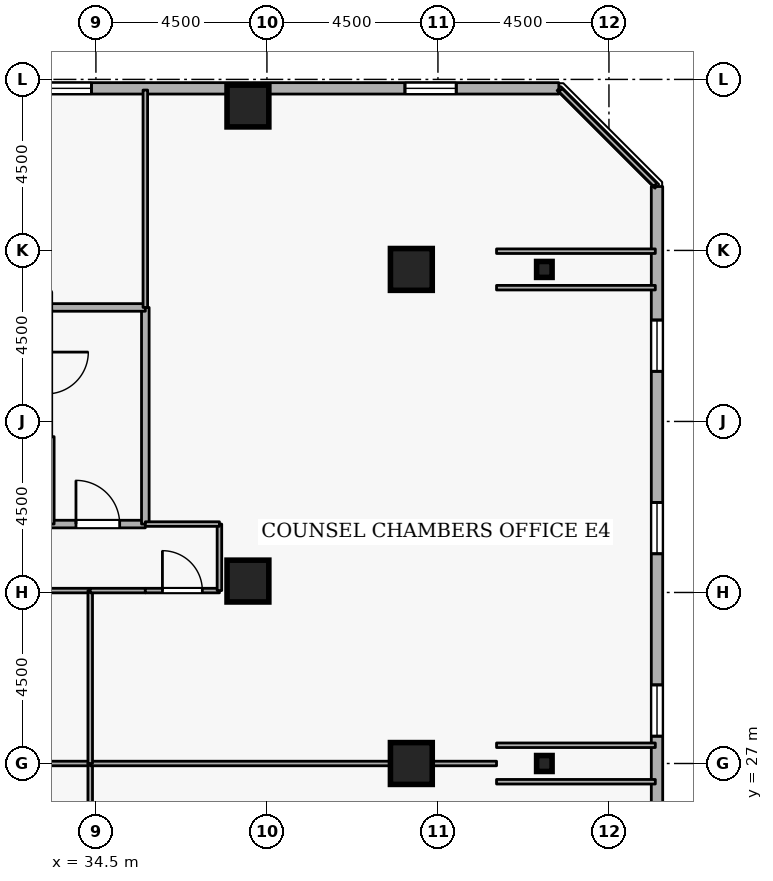
"""IFC4 building model, lengths in metres.
Left out: names, types, materials, properties, quantities, classifications, styles, units other than length and angle.
Written with IfcOpenShell. Run it as: python <this file> out.ifc"""

import sys

from ifc_helpers import new_model, si_unit, direction, frame, frame_2d, origin, origin_2d, place, context, subcontext, project, spatial, rectangle, i_section, extrude, element, fill, save


model = new_model("IFC4")
c1 = context("Model", 3, precision=1e-05, world=origin(), true_north=direction((0.0, 1.0)))
c2 = subcontext(c1, "Body", "Model", "MODEL_VIEW")
j1 = project(units=[si_unit("LENGTHUNIT", "METRE"), si_unit("PLANEANGLEUNIT", "RADIAN")], contexts=[c1])
p1 = place(None, origin())
s1 = spatial("IfcSite", under=j1, at=p1, CompositionType="ELEMENT")
p2 = place(p1, origin())
s2 = spatial("IfcBuilding", under=s1, at=p2, CompositionType="ELEMENT")
p3 = place(p2, frame((0.0, 0.0, 170.7)))
s3 = spatial("IfcBuildingStorey", under=s2, at=p3, CompositionType="ELEMENT", Elevation=170.7)
for number, where, z_axis, x_axis in (
    (1, (42.8, 27.0, 0.0), (0.0, 0.0, 1.0), (1.0, 0.0, 0.0)),
    (2, (42.8, 40.0, 0.0), (0.0, 0.0, 1.0), (1.0, 0.0, 0.0)),
    (3, (38.5, 44.3, 0.0), (0.0, 0.0, 1.0), (1.0, 0.0, 0.0)),
    (4, (38.5, 31.8, 0.0), (0.0, 0.0, 1.0), (1.0, 0.0, 0.0)),
):
    element("IfcColumn", number, at=place(p3, frame(where, z_axis=z_axis, x_axis=x_axis)), inside=s3, PredefinedType="COLUMN", context=c2, shape_type="SweptSolid", body=[
        extrude(rectangle(XDim=1.1, YDim=1.1, at=origin_2d()), origin(), (0.0, 0.0, 1.0), 3.6),
    ])
for number, where, z_axis, x_axis in (
    (5, (46.3, 27.0, 0.0), (0.0, 0.0, 1.0), (1.0, 0.0, 0.0)),
    (6, (46.3, 40.0, 0.0), (0.0, 0.0, 1.0), (1.0, 0.0, 0.0)),
):
    element("IfcColumn", number, at=place(p3, frame(where, z_axis=z_axis, x_axis=x_axis)), inside=s3, PredefinedType="COLUMN", context=c2, shape_type="SweptSolid", body=[
        extrude(i_section(OverallWidth=0.407, OverallDepth=0.419, WebThickness=0.031, FlangeThickness=0.049, FilletRadius=0.015, at=origin_2d()), origin(), (0.0, 0.0, 1.0), 3.6),
    ])
p4 = place(p3, frame((49.265, 5.819, 0.0), z_axis=(0.0, 0.0, 1.0), x_axis=(0.0, 1.0, 0.0)))
e7 = element("IfcWall", 7, at=p4, inside=s3, PredefinedType="STANDARD", context=c2, shape_type="SweptSolid", body=[
    extrude(rectangle(XDim=36.363, YDim=0.3, at=frame_2d((18.181, 0.0))), origin(), (0.0, 0.0, 1.0), 2.22),
])
p5 = place(p4, frame((2.7, 0.0, 0.72)))
e8 = element("IfcOpeningElement", 8, at=p5, cuts=e7, PredefinedType="OPENING", context=c2, shape_type="SweptSolid", body=[
    extrude(rectangle(XDim=1.35, YDim=1.05, at=frame_2d((0.675, 0.525))), frame((0.0, 0.16, 0.0), z_axis=(0.0, -1.0, 0.0), x_axis=(1.0, 0.0, 0.0)), (0.0, 0.0, 1.0), 0.32),
])
p6 = place(p4, frame((12.3, 0.0, 0.72)))
e9 = element("IfcOpeningElement", 9, at=p6, cuts=e7, PredefinedType="OPENING", context=c2, shape_type="SweptSolid", body=[
    extrude(rectangle(XDim=1.35, YDim=1.05, at=frame_2d((0.675, 0.525))), frame((0.0, 0.16, 0.0), z_axis=(0.0, -1.0, 0.0), x_axis=(1.0, 0.0, 0.0)), (0.0, 0.0, 1.0), 0.32),
])
p7 = place(p4, frame((17.1, 0.0, 0.72)))
e10 = element("IfcOpeningElement", 10, at=p7, cuts=e7, PredefinedType="OPENING", context=c2, shape_type="SweptSolid", body=[
    extrude(rectangle(XDim=1.35, YDim=1.05, at=frame_2d((0.675, 0.525))), frame((0.0, 0.16, 0.0), z_axis=(0.0, -1.0, 0.0), x_axis=(1.0, 0.0, 0.0)), (0.0, 0.0, 1.0), 0.32),
])
p8 = place(p4, frame((21.9, 0.0, 0.72)))
e11 = element("IfcOpeningElement", 11, at=p8, cuts=e7, PredefinedType="OPENING", context=c2, shape_type="SweptSolid", body=[
    extrude(rectangle(XDim=1.35, YDim=1.05, at=frame_2d((0.675, 0.525))), frame((0.0, 0.16, 0.0), z_axis=(0.0, -1.0, 0.0), x_axis=(1.0, 0.0, 0.0)), (0.0, 0.0, 1.0), 0.32),
])
p9 = place(p4, frame((26.7, 0.0, 0.72)))
e12 = element("IfcOpeningElement", 12, at=p9, cuts=e7, PredefinedType="OPENING", context=c2, shape_type="SweptSolid", body=[
    extrude(rectangle(XDim=1.35, YDim=1.05, at=frame_2d((0.675, 0.525))), frame((0.0, 0.16, 0.0), z_axis=(0.0, -1.0, 0.0), x_axis=(1.0, 0.0, 0.0)), (0.0, 0.0, 1.0), 0.32),
])
p10 = place(p4, frame((31.5, 0.0, 0.72)))
e13 = element("IfcOpeningElement", 13, at=p10, cuts=e7, PredefinedType="OPENING", context=c2, shape_type="SweptSolid", body=[
    extrude(rectangle(XDim=1.35, YDim=1.05, at=frame_2d((0.675, 0.525))), frame((0.0, 0.16, 0.0), z_axis=(0.0, -1.0, 0.0), x_axis=(1.0, 0.0, 0.0)), (0.0, 0.0, 1.0), 0.32),
])
p11 = place(p3, frame((46.681, 44.765, 0.0), z_axis=(0.0, 0.0, 1.0), x_axis=(-1.0, 0.0, 0.0)))
e14 = element("IfcWall", 14, at=p11, inside=s3, PredefinedType="STANDARD", context=c2, shape_type="SweptSolid", body=[
    extrude(rectangle(XDim=36.363, YDim=0.3, at=frame_2d((18.181, 0.0))), origin(), (0.0, 0.0, 1.0), 2.22),
])
p12 = place(p11, frame((2.7, 0.0, 0.72)))
e15 = element("IfcOpeningElement", 15, at=p12, cuts=e14, PredefinedType="OPENING", context=c2, shape_type="SweptSolid", body=[
    extrude(rectangle(XDim=1.35, YDim=1.05, at=frame_2d((0.675, 0.525))), frame((0.0, 0.16, 0.0), z_axis=(0.0, -1.0, 0.0), x_axis=(1.0, 0.0, 0.0)), (0.0, 0.0, 1.0), 0.32),
])
p13 = place(p11, frame((12.3, 0.0, 0.72)))
e16 = element("IfcOpeningElement", 16, at=p13, cuts=e14, PredefinedType="OPENING", context=c2, shape_type="SweptSolid", body=[
    extrude(rectangle(XDim=1.35, YDim=1.05, at=frame_2d((0.675, 0.525))), frame((0.0, 0.16, 0.0), z_axis=(0.0, -1.0, 0.0), x_axis=(1.0, 0.0, 0.0)), (0.0, 0.0, 1.0), 0.32),
])
p14 = place(p11, frame((17.1, 0.0, 0.72)))
e17 = element("IfcOpeningElement", 17, at=p14, cuts=e14, PredefinedType="OPENING", context=c2, shape_type="SweptSolid", body=[
    extrude(rectangle(XDim=1.35, YDim=1.05, at=frame_2d((0.675, 0.525))), frame((0.0, 0.16, 0.0), z_axis=(0.0, -1.0, 0.0), x_axis=(1.0, 0.0, 0.0)), (0.0, 0.0, 1.0), 0.32),
])
p15 = place(p11, frame((26.7, 0.0, 0.72)))
e18 = element("IfcOpeningElement", 18, at=p15, cuts=e14, PredefinedType="OPENING", context=c2, shape_type="SweptSolid", body=[
    extrude(rectangle(XDim=1.35, YDim=1.05, at=frame_2d((0.675, 0.525))), frame((0.0, 0.16, 0.0), z_axis=(0.0, -1.0, 0.0), x_axis=(1.0, 0.0, 0.0)), (0.0, 0.0, 1.0), 0.32),
])
p16 = place(p3, frame((33.3, 33.3, 0.0), z_axis=(0.0, 0.0, 1.0), x_axis=(1.0, 0.0, 0.0)))
e19 = element("IfcWall", 19, at=p16, inside=s3, PredefinedType="STANDARD", context=c2, shape_type="SweptSolid", body=[
    extrude(rectangle(XDim=2.5, YDim=0.2, at=frame_2d((1.25, 0.0))), origin(), (0.0, 0.0, 1.0), 3.26),
])
p17 = place(p16, frame((0.675, 0.0, 0.0)))
e20 = element("IfcOpeningElement", 20, at=p17, cuts=e19, PredefinedType="OPENING", context=c2, shape_type="SweptSolid", body=[
    extrude(rectangle(XDim=1.15, YDim=2.1, at=frame_2d((0.575, 1.05))), frame((0.0, 0.11, 0.0), z_axis=(0.0, -1.0, 0.0), x_axis=(1.0, 0.0, 0.0)), (0.0, 0.0, 1.0), 0.22),
])
p18 = place(p3, frame((35.8, 33.3, 0.0), z_axis=(0.0, 0.0, 1.0), x_axis=(0.0, 1.0, 0.0)))
e21 = element("IfcWall", 21, at=p18, inside=s3, PredefinedType="STANDARD", context=c2, shape_type="SweptSolid", body=[
    extrude(rectangle(XDim=5.7, YDim=0.2, at=frame_2d((2.85, 0.0))), origin(), (0.0, 0.0, 1.0), 3.26),
])
p19 = place(p3, frame((35.8, 39.0, 0.0), z_axis=(0.0, 0.0, 1.0), x_axis=(-1.0, 0.0, 0.0)))
e22 = element("IfcWall", 22, at=p19, inside=s3, PredefinedType="STANDARD", context=c2, shape_type="SweptSolid", body=[
    extrude(rectangle(XDim=2.5, YDim=0.2, at=frame_2d((1.25, 0.0))), origin(), (0.0, 0.0, 1.0), 3.26),
])
p20 = place(p3, frame((33.3, 35.6, 0.0), z_axis=(0.0, 0.0, 1.0), x_axis=(0.0, -1.0, 0.0)))
e23 = element("IfcWall", 23, at=p20, inside=s3, PredefinedType="STANDARD", context=c2, shape_type="SweptSolid", body=[
    extrude(rectangle(XDim=2.3, YDim=0.2, at=frame_2d((1.15, 0.0))), origin(), (0.0, 0.0, 1.0), 2.465),
])
p21 = place(p3, frame((32.45, 27.0, 0.0), z_axis=(0.0, 0.0, 1.0), x_axis=(1.0, 0.0, 0.0)))
e24 = element("IfcWall", 24, at=p21, inside=s3, PredefinedType="PARTITIONING", context=c2, shape_type="SweptSolid", body=[
    extrude(rectangle(XDim=1.9, YDim=0.12, at=frame_2d((0.95, 0.0))), origin(), (0.0, 0.0, 1.0), 1.785),
])
p22 = place(p3, frame((34.35, 27.0, 0.0), z_axis=(0.0, 0.0, 1.0), x_axis=(0.0, -1.0, 0.0)))
e25 = element("IfcWall", 25, at=p22, inside=s3, PredefinedType="PARTITIONING", context=c2, shape_type="SweptSolid", body=[
    extrude(rectangle(XDim=4.55, YDim=0.12, at=frame_2d((2.275, 0.0))), origin(), (0.0, 0.0, 1.0), 3.26),
])
p23 = place(p3, frame((34.35, 27.0, 0.0), z_axis=(0.0, 0.0, 1.0), x_axis=(1.0, 0.0, 0.0)))
e26 = element("IfcWall", 26, at=p23, inside=s3, PredefinedType="PARTITIONING", context=c2, shape_type="SweptSolid", body=[
    extrude(rectangle(XDim=10.692, YDim=0.12, at=frame_2d((5.346, 0.0))), origin(), (0.0, 0.0, 1.0), 1.785),
])
p24 = place(p3, frame((45.042, 26.52, 0.0), z_axis=(0.0, 0.0, 1.0), x_axis=(1.0, 0.0, 0.0)))
e27 = element("IfcWall", 27, at=p24, inside=s3, PredefinedType="PARTITIONING", context=c2, shape_type="SweptSolid", body=[
    extrude(rectangle(XDim=4.178, YDim=0.12, at=frame_2d((2.089, 0.0))), origin(), (0.0, 0.0, 1.0), 1.785),
])
p25 = place(p3, frame((32.45, 31.55, 0.0), z_axis=(0.0, 0.0, 1.0), x_axis=(1.0, 0.0, 0.0)))
e28 = element("IfcWall", 28, at=p25, inside=s3, PredefinedType="PARTITIONING", context=c2, shape_type="SweptSolid", body=[
    extrude(rectangle(XDim=1.9, YDim=0.12, at=frame_2d((0.95, 0.0))), origin(), (0.0, 0.0, 1.0), 3.26),
])
p26 = place(p3, frame((34.35, 31.55, 0.0), z_axis=(0.0, 0.0, 1.0), x_axis=(0.0, -1.0, 0.0)))
e29 = element("IfcWall", 29, at=p26, inside=s3, PredefinedType="PARTITIONING", context=c2, shape_type="SweptSolid", body=[
    extrude(rectangle(XDim=4.55, YDim=0.12, at=frame_2d((2.275, 0.0))), origin(), (0.0, 0.0, 1.0), 3.26),
])
p27 = place(p3, frame((34.35, 31.55, 0.0), z_axis=(0.0, 0.0, 1.0), x_axis=(1.0, 0.0, 0.0)))
e30 = element("IfcWall", 30, at=p27, inside=s3, PredefinedType="PARTITIONING", context=c2, shape_type="SweptSolid", body=[
    extrude(rectangle(XDim=1.45, YDim=0.12, at=frame_2d((0.725, 0.0))), origin(), (0.0, 0.0, 1.0), 3.26),
])
p28 = place(p3, frame((35.8, 31.55, 0.0), z_axis=(0.0, 0.0, 1.0), x_axis=(1.0, 0.0, 0.0)))
e31 = element("IfcWall", 31, at=p28, inside=s3, PredefinedType="PARTITIONING", context=c2, shape_type="SweptSolid", body=[
    extrude(rectangle(XDim=1.95, YDim=0.12, at=frame_2d((0.975, 0.0))), origin(), (0.0, 0.0, 1.0), 3.26),
])
p29 = place(p28, frame((0.45, 0.0, 0.0)))
e32 = element("IfcOpeningElement", 32, at=p29, cuts=e31, PredefinedType="OPENING", context=c2, shape_type="SweptSolid", body=[
    extrude(rectangle(XDim=1.05, YDim=2.1, at=frame_2d((0.525, 1.05))), frame((0.0, 0.07, 0.0), z_axis=(0.0, -1.0, 0.0), x_axis=(1.0, 0.0, 0.0)), (0.0, 0.0, 1.0), 0.14),
])
p30 = place(p3, frame((37.75, 31.55, 0.0), z_axis=(0.0, 0.0, 1.0), x_axis=(0.0, 1.0, 0.0)))
e33 = element("IfcWall", 33, at=p30, inside=s3, PredefinedType="PARTITIONING", context=c2, shape_type="SweptSolid", body=[
    extrude(rectangle(XDim=1.75, YDim=0.12, at=frame_2d((0.875, 0.0))), origin(), (0.0, 0.0, 1.0), 3.26),
])
p31 = place(p3, frame((37.75, 33.3, 0.0), z_axis=(0.0, 0.0, 1.0), x_axis=(-1.0, 0.0, 0.0)))
e34 = element("IfcWall", 34, at=p31, inside=s3, PredefinedType="PARTITIONING", context=c2, shape_type="SweptSolid", body=[
    extrude(rectangle(XDim=1.95, YDim=0.12, at=frame_2d((0.975, 0.0))), origin(), (0.0, 0.0, 1.0), 3.26),
])
p32 = place(p3, frame((35.8, 39.0, 0.0), z_axis=(0.0, 0.0, 1.0), x_axis=(0.0, 1.0, 0.0)))
e35 = element("IfcWall", 35, at=p32, inside=s3, PredefinedType="PARTITIONING", context=c2, shape_type="SweptSolid", body=[
    extrude(rectangle(XDim=5.72, YDim=0.12, at=frame_2d((2.86, 0.0))), origin(), (0.0, 0.0, 1.0), 3.26),
])
p33 = place(p3, frame((46.725, 44.72, 0.0), z_axis=(0.0, 0.0, 1.0), x_axis=(0.707106781187, -0.707106781187, 0.0)))
e36 = element("IfcWall", 36, at=p33, inside=s3, PredefinedType="PARTITIONING", context=c2, shape_type="SweptSolid", body=[
    extrude(rectangle(XDim=3.528, YDim=0.12, at=frame_2d((1.764, 0.0))), origin(), (0.0, 0.0, 1.0), 3.26),
])
for number, where, z_axis, x_axis in (
    (37, (49.22, 40.48, 0.0), (0.0, 0.0, 1.0), (-1.0, 0.0, 0.0)),
    (38, (45.042, 39.52, 0.0), (0.0, 0.0, 1.0), (1.0, 0.0, 0.0)),
    (39, (49.22, 27.48, 0.0), (0.0, 0.0, 1.0), (-1.0, 0.0, 0.0)),
):
    element("IfcWall", number, at=place(p3, frame(where, z_axis=z_axis, x_axis=x_axis)), inside=s3, PredefinedType="PARTITIONING", context=c2, shape_type="SweptSolid", body=[
        extrude(rectangle(XDim=4.178, YDim=0.12, at=frame_2d((2.089, 0.0))), origin(), (0.0, 0.0, 1.0), 1.785),
    ])
p34 = place(p8, origin())
e40 = element("IfcWindow", 40, at=p34, inside=s3, PartitioningType="SINGLE_PANEL", PredefinedType="WINDOW", context=c2, shape_type="SweptSolid", body=[
    extrude(rectangle(XDim=1.35, YDim=1.05, at=frame_2d((0.675, 0.525))), frame((0.0, 0.03, 0.0), z_axis=(0.0, -1.0, 0.0), x_axis=(1.0, 0.0, 0.0)), (0.0, 0.0, 1.0), 0.06),
])
fill(e11, e40)
p35 = place(p9, origin())
e41 = element("IfcWindow", 41, at=p35, inside=s3, PartitioningType="SINGLE_PANEL", PredefinedType="WINDOW", context=c2, shape_type="SweptSolid", body=[
    extrude(rectangle(XDim=1.35, YDim=1.05, at=frame_2d((0.675, 0.525))), frame((0.0, 0.03, 0.0), z_axis=(0.0, -1.0, 0.0), x_axis=(1.0, 0.0, 0.0)), (0.0, 0.0, 1.0), 0.06),
])
fill(e12, e41)
p36 = place(p10, origin())
e42 = element("IfcWindow", 42, at=p36, inside=s3, PartitioningType="SINGLE_PANEL", PredefinedType="WINDOW", context=c2, shape_type="SweptSolid", body=[
    extrude(rectangle(XDim=1.35, YDim=1.05, at=frame_2d((0.675, 0.525))), frame((0.0, 0.03, 0.0), z_axis=(0.0, -1.0, 0.0), x_axis=(1.0, 0.0, 0.0)), (0.0, 0.0, 1.0), 0.06),
])
fill(e13, e42)
p37 = place(p12, origin())
e43 = element("IfcWindow", 43, at=p37, inside=s3, PartitioningType="SINGLE_PANEL", PredefinedType="WINDOW", context=c2, shape_type="SweptSolid", body=[
    extrude(rectangle(XDim=1.35, YDim=1.05, at=frame_2d((0.675, 0.525))), frame((0.0, 0.03, 0.0), z_axis=(0.0, -1.0, 0.0), x_axis=(1.0, 0.0, 0.0)), (0.0, 0.0, 1.0), 0.06),
])
fill(e15, e43)
p38 = place(p13, origin())
e44 = element("IfcWindow", 44, at=p38, inside=s3, PartitioningType="SINGLE_PANEL", PredefinedType="WINDOW", context=c2, shape_type="SweptSolid", body=[
    extrude(rectangle(XDim=1.35, YDim=1.05, at=frame_2d((0.675, 0.525))), frame((0.0, 0.03, 0.0), z_axis=(0.0, -1.0, 0.0), x_axis=(1.0, 0.0, 0.0)), (0.0, 0.0, 1.0), 0.06),
])
fill(e16, e44)
p39 = place(p17, origin())
e45 = element("IfcDoor", 45, at=p39, inside=s3, OperationType="SINGLE_SWING_LEFT", PredefinedType="DOOR", context=c2, shape_type="SweptSolid", body=[
    extrude(rectangle(XDim=1.15, YDim=2.1, at=frame_2d((0.575, 1.05))), frame((0.0, 0.025, 0.0), z_axis=(0.0, -1.0, 0.0), x_axis=(1.0, 0.0, 0.0)), (0.0, 0.0, 1.0), 0.05),
])
fill(e20, e45)
p40 = place(p29, origin())
e46 = element("IfcDoor", 46, at=p40, inside=s3, OperationType="SINGLE_SWING_LEFT", PredefinedType="DOOR", context=c2, shape_type="SweptSolid", body=[
    extrude(rectangle(XDim=1.05, YDim=2.1, at=frame_2d((0.525, 1.05))), frame((0.0, 0.025, 0.0), z_axis=(0.0, -1.0, 0.0), x_axis=(1.0, 0.0, 0.0)), (0.0, 0.0, 1.0), 0.05),
])
fill(e32, e46)
save(model, sys.argv[1])
